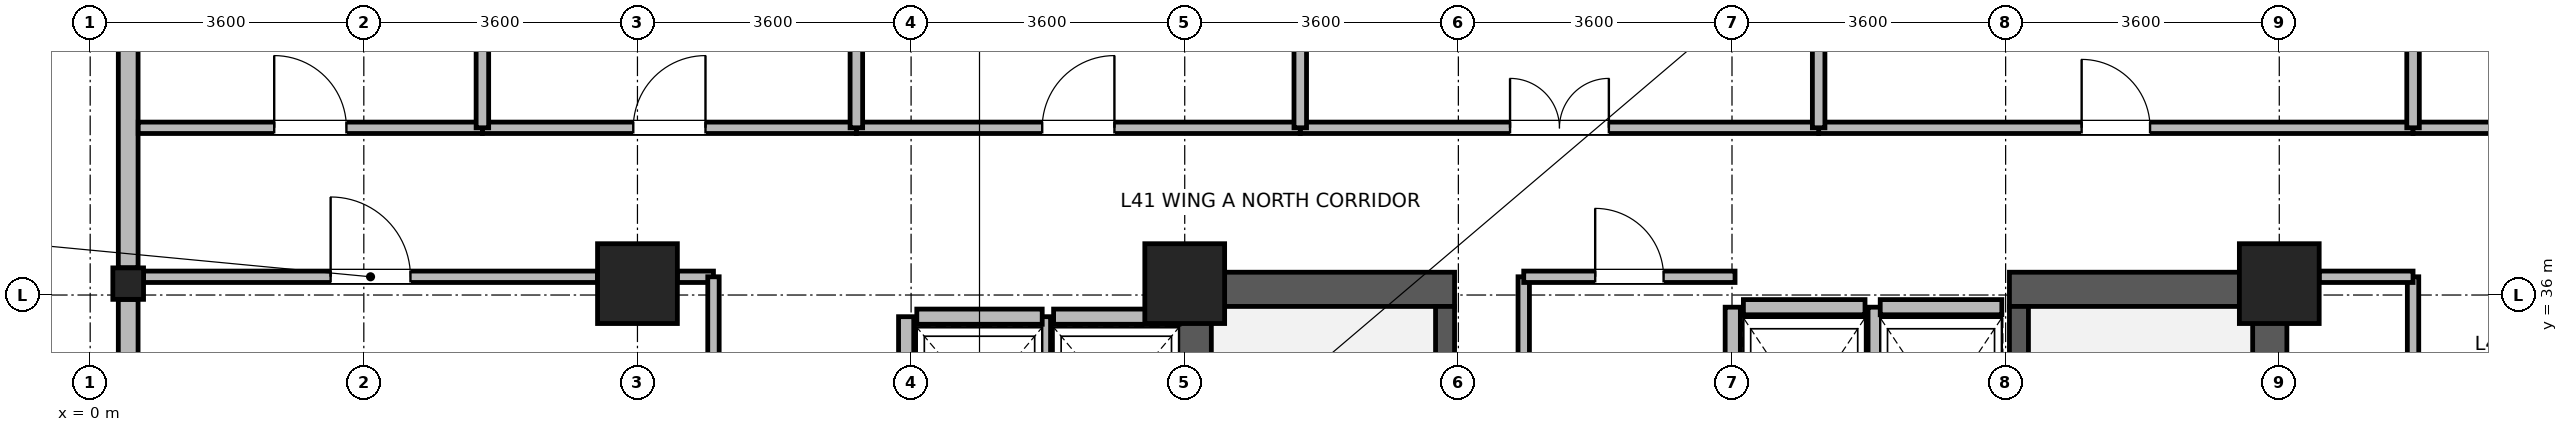
"""IFC4 building model, lengths in metres.
Left out: names, types, materials, properties, quantities, classifications, styles, units other than length and angle.
Written with IfcOpenShell. Run it as: python <this file> out.ifc"""

import sys

from ifc_helpers import new_model, si_unit, direction, frame, frame_2d, origin, origin_2d, place, context, subcontext, project, spatial, rectangle, i_section, extrude, source, transform, mapped, element, fill, save


model = new_model("IFC4")
c1 = context("Model", 3, precision=1e-05, world=origin(), true_north=direction((0.0, 1.0)))
c2 = subcontext(c1, "Body", "Model", "MODEL_VIEW")
j1 = project(units=[si_unit("LENGTHUNIT", "METRE"), si_unit("PLANEANGLEUNIT", "RADIAN")], contexts=[c1])
p1 = place(None, origin())
s1 = spatial("IfcSite", under=j1, at=p1, CompositionType="ELEMENT")
p2 = place(p1, origin())
s2 = spatial("IfcBuilding", under=s1, at=p2, CompositionType="ELEMENT")
p3 = place(p2, frame((0.0, 0.0, 162.4)))
s3 = spatial("IfcBuildingStorey", under=s2, at=p3, CompositionType="ELEMENT", Elevation=162.4)
for number, where, z_axis, x_axis in (
    (1, (14.525, 28.4, 0.0), (0.0, 0.0, 1.0), (0.0, 1.0, 0.0)),
    (2, (28.675, 28.4, 0.0), (0.0, 0.0, 1.0), (0.0, 1.0, 0.0)),
):
    element("IfcWall", number, at=place(p3, frame(where, z_axis=z_axis, x_axis=x_axis)), inside=s3, PredefinedType="SHEAR", context=c2, shape_type="SweptSolid", body=[
        extrude(rectangle(XDim=7.9, YDim=0.45, at=frame_2d((3.95, 0.0))), origin(), (0.0, 0.0, 1.0), 3.46),
    ])
for number, where, z_axis, x_axis in (
    (3, (14.75, 36.075, 0.0), (0.0, 0.0, 1.0), (1.0, 0.0, 0.0)),
    (4, (25.25, 36.075, 0.0), (0.0, 0.0, 1.0), (1.0, 0.0, 0.0)),
):
    element("IfcWall", number, at=place(p3, frame(where, z_axis=z_axis, x_axis=x_axis)), inside=s3, PredefinedType="SHEAR", context=c2, shape_type="SweptSolid", body=[
        extrude(rectangle(XDim=3.2, YDim=0.45, at=frame_2d((1.6, 0.0))), origin(), (0.0, 0.0, 1.0), 3.46),
    ])
p4 = place(p3, frame((17.825, 28.85, 0.0), z_axis=(0.0, 0.0, 1.0), x_axis=(0.0, 1.0, 0.0)))
e5 = element("IfcWall", 5, at=p4, inside=s3, PredefinedType="SHEAR", context=c2, shape_type="SweptSolid", body=[
    extrude(rectangle(XDim=7.0, YDim=0.25, at=frame_2d((3.5, 0.0))), origin(), (0.0, 0.0, 1.0), 3.46),
])
p5 = place(p4, frame((0.15, 0.0, 0.0)))
e6 = element("IfcOpeningElement", 6, at=p5, cuts=e5, PredefinedType="OPENING", context=c2, shape_type="SweptSolid", body=[
    extrude(rectangle(XDim=1.1, YDim=2.08, at=frame_2d((0.55, 1.04))), frame((0.0, 0.135, 0.0), z_axis=(0.0, -1.0, 0.0), x_axis=(1.0, 0.0, 0.0)), (0.0, 0.0, 1.0), 0.27),
])
p6 = place(p3, frame((25.375, 28.85, 0.0), z_axis=(0.0, 0.0, 1.0), x_axis=(0.0, 1.0, 0.0)))
e7 = element("IfcWall", 7, at=p6, inside=s3, PredefinedType="SHEAR", context=c2, shape_type="SweptSolid", body=[
    extrude(rectangle(XDim=7.0, YDim=0.25, at=frame_2d((3.5, 0.0))), origin(), (0.0, 0.0, 1.0), 3.46),
])
p7 = place(p6, frame((0.15, 0.0, 0.0)))
e8 = element("IfcOpeningElement", 8, at=p7, cuts=e7, PredefinedType="OPENING", context=c2, shape_type="SweptSolid", body=[
    extrude(rectangle(XDim=1.1, YDim=2.08, at=frame_2d((0.55, 1.04))), frame((0.0, 0.135, 0.0), z_axis=(0.0, -1.0, 0.0), x_axis=(1.0, 0.0, 0.0)), (0.0, 0.0, 1.0), 0.27),
])
m1 = source(origin(), c2, "Body", "SweptSolid", [
    extrude(rectangle(XDim=1.05, YDim=1.05, at=origin_2d()), origin(), (0.0, 0.0, 1.0), 3.7),
])
for number, where, z_axis, x_axis in (
    (9, (7.2, 36.15, 0.0), (0.0, 0.0, 1.0), (1.0, 0.0, 0.0)),
    (10, (14.4, 36.15, 0.0), (0.0, 0.0, 1.0), (1.0, 0.0, 0.0)),
    (11, (28.8, 36.15, 0.0), (0.0, 0.0, 1.0), (1.0, 0.0, 0.0)),
):
    element("IfcColumn", number, at=place(p3, frame(where, z_axis=z_axis, x_axis=x_axis)), inside=s3, PredefinedType="COLUMN", context=c2, shape_type="MappedRepresentation", body=[
        mapped(m1, transform((0.0, 0.0, 0.0), x_axis=(1.0, 0.0, 0.0), y_axis=(0.0, 1.0, 0.0), z_axis=(0.0, 0.0, 1.0), scale=1.0)),
    ])
m2 = source(origin(), c2, "Body", "SweptSolid", [
    extrude(i_section(OverallWidth=0.404, OverallDepth=0.414, WebThickness=0.021, FlangeThickness=0.028, FilletRadius=0.015, at=origin_2d()), origin(), (0.0, 0.0, 1.0), 3.7),
])
p8 = place(p3, frame((0.5, 36.15, 0.0), z_axis=(0.0, 0.0, 1.0), x_axis=(1.0, 0.0, 0.0)))
e12 = element("IfcColumn", 12, at=p8, inside=s3, PredefinedType="COLUMN", context=c2, shape_type="MappedRepresentation", body=[
    mapped(m2, transform((0.0, 0.0, 0.0), x_axis=(1.0, 0.0, 0.0), y_axis=(0.0, 1.0, 0.0), z_axis=(0.0, 0.0, 1.0), scale=1.0)),
])
p9 = place(p3, frame((0.5, 36.358, 0.0), z_axis=(0.0, 0.0, 1.0), x_axis=(0.0, 1.0, 0.0)))
e13 = element("IfcWall", 13, at=p9, inside=s3, PredefinedType="STANDARD", context=c2, shape_type="SweptSolid", body=[
    extrude(rectangle(XDim=6.972, YDim=0.26, at=frame_2d((3.486, 0.0))), origin(), (0.0, 0.0, 1.0), 3.44),
])
p10 = place(p9, frame((4.329, 0.0, 0.85)))
e14 = element("IfcOpeningElement", 14, at=p10, cuts=e13, PredefinedType="OPENING", context=c2, shape_type="SweptSolid", body=[
    extrude(rectangle(XDim=1.8, YDim=1.85, at=frame_2d((0.9, 0.925))), frame((0.0, 0.14, 0.0), z_axis=(0.0, -1.0, 0.0), x_axis=(1.0, 0.0, 0.0)), (0.0, 0.0, 1.0), 0.28),
])
p11 = place(p9, frame((3.011, 0.0, 0.85)))
e15 = element("IfcOpeningElement", 15, at=p11, cuts=e13, PredefinedType="OPENING", context=c2, shape_type="SweptSolid", body=[
    extrude(rectangle(XDim=0.95, YDim=1.75, at=frame_2d((0.475, 0.875))), frame((0.0, 0.14, 0.0), z_axis=(0.0, -1.0, 0.0), x_axis=(1.0, 0.0, 0.0)), (0.0, 0.0, 1.0), 0.28),
])
p12 = place(p3, frame((0.5, 28.858, 0.0), z_axis=(0.0, 0.0, 1.0), x_axis=(0.0, 1.0, 0.0)))
e16 = element("IfcWall", 16, at=p12, inside=s3, PredefinedType="STANDARD", context=c2, shape_type="SweptSolid", body=[
    extrude(rectangle(XDim=7.084, YDim=0.26, at=frame_2d((3.542, 0.0))), origin(), (0.0, 0.0, 1.0), 2.99),
])
p13 = place(p12, frame((0.871, 0.0, 0.85)))
e17 = element("IfcOpeningElement", 17, at=p13, cuts=e16, PredefinedType="OPENING", context=c2, shape_type="SweptSolid", body=[
    extrude(rectangle(XDim=1.8, YDim=1.85, at=frame_2d((0.9, 0.925))), frame((0.0, 0.14, 0.0), z_axis=(0.0, -1.0, 0.0), x_axis=(1.0, 0.0, 0.0)), (0.0, 0.0, 1.0), 0.28),
])
p14 = place(p12, frame((4.413, 0.0, 0.85)))
e18 = element("IfcOpeningElement", 18, at=p14, cuts=e16, PredefinedType="OPENING", context=c2, shape_type="SweptSolid", body=[
    extrude(rectangle(XDim=1.8, YDim=1.85, at=frame_2d((0.9, 0.925))), frame((0.0, 0.14, 0.0), z_axis=(0.0, -1.0, 0.0), x_axis=(1.0, 0.0, 0.0)), (0.0, 0.0, 1.0), 0.28),
])
p15 = place(p3, frame((12.675, 35.715, 0.0), z_axis=(0.0, 0.0, 1.0), x_axis=(1.0, 0.0, 0.0)))
e19 = element("IfcWall", 19, at=p15, inside=s3, PredefinedType="PARTITIONING", context=c2, shape_type="SweptSolid", body=[
    extrude(rectangle(XDim=1.65, YDim=0.2, at=frame_2d((0.825, 0.0))), origin(), (0.0, 0.0, 1.0), 3.44),
])
p16 = place(p3, frame((12.535, 33.485, 0.0), z_axis=(0.0, 0.0, 1.0), x_axis=(0.0, 1.0, 0.0)))
e20 = element("IfcWall", 20, at=p16, inside=s3, PredefinedType="PARTITIONING", context=c2, shape_type="SweptSolid", body=[
    extrude(rectangle(XDim=2.23, YDim=0.2, at=frame_2d((1.115, 0.0))), origin(), (0.0, 0.0, 1.0), 3.44),
])
p17 = place(p3, frame((10.875, 35.715, 0.0), z_axis=(0.0, 0.0, 1.0), x_axis=(1.0, 0.0, 0.0)))
e21 = element("IfcWall", 21, at=p17, inside=s3, PredefinedType="PARTITIONING", context=c2, shape_type="SweptSolid", body=[
    extrude(rectangle(XDim=1.65, YDim=0.2, at=frame_2d((0.825, 0.0))), origin(), (0.0, 0.0, 1.0), 3.44),
])
p18 = place(p3, frame((10.735, 33.485, 0.0), z_axis=(0.0, 0.0, 1.0), x_axis=(0.0, 1.0, 0.0)))
e22 = element("IfcWall", 22, at=p18, inside=s3, PredefinedType="PARTITIONING", context=c2, shape_type="SweptSolid", body=[
    extrude(rectangle(XDim=2.23, YDim=0.2, at=frame_2d((1.115, 0.0))), origin(), (0.0, 0.0, 1.0), 3.44),
])
p19 = place(p3, frame((21.75, 35.84, 0.0), z_axis=(0.0, 0.0, 1.0), x_axis=(1.0, 0.0, 0.0)))
e23 = element("IfcWall", 23, at=p19, inside=s3, PredefinedType="PARTITIONING", context=c2, shape_type="SweptSolid", body=[
    extrude(rectangle(XDim=1.6, YDim=0.2, at=frame_2d((0.8, 0.0))), origin(), (0.0, 0.0, 1.0), 2.44),
])
for number, where, z_axis, x_axis in (
    (24, (21.61, 33.16, 0.0), (0.0, 0.0, 1.0), (0.0, 1.0, 0.0)),
    (25, (23.49, 33.16, 0.0), (0.0, 0.0, 1.0), (0.0, 1.0, 0.0)),
):
    element("IfcWall", number, at=place(p3, frame(where, z_axis=z_axis, x_axis=x_axis)), inside=s3, PredefinedType="PARTITIONING", context=c2, shape_type="SweptSolid", body=[
        extrude(rectangle(XDim=2.68, YDim=0.2, at=frame_2d((1.34, 0.0))), origin(), (0.0, 0.0, 1.0), 3.44),
    ])
p20 = place(p3, frame((23.55, 35.84, 0.0), z_axis=(0.0, 0.0, 1.0), x_axis=(1.0, 0.0, 0.0)))
e26 = element("IfcWall", 26, at=p20, inside=s3, PredefinedType="PARTITIONING", context=c2, shape_type="SweptSolid", body=[
    extrude(rectangle(XDim=1.6, YDim=0.2, at=frame_2d((0.8, 0.0))), origin(), (0.0, 0.0, 1.0), 2.44),
])
p21 = place(p3, frame((22.74, 38.2, 0.0), z_axis=(0.0, 0.0, 1.0), x_axis=(1.0, 0.0, 0.0)))
e27 = element("IfcWall", 27, at=p21, inside=s3, PredefinedType="PARTITIONING", context=c2, shape_type="SweptSolid", body=[
    extrude(rectangle(XDim=7.82, YDim=0.15, at=frame_2d((3.91, 0.0))), origin(), (0.0, 0.0, 1.0), 3.44),
])
p22 = place(p21, frame((3.46, 0.0, 0.0)))
e28 = element("IfcOpeningElement", 28, at=p22, cuts=e27, PredefinedType="OPENING", context=c2, shape_type="SweptSolid", body=[
    extrude(rectangle(XDim=0.9, YDim=2.08, at=frame_2d((0.45, 1.04))), frame((0.0, 0.085, 0.0), z_axis=(0.0, -1.0, 0.0), x_axis=(1.0, 0.0, 0.0)), (0.0, 0.0, 1.0), 0.17),
])
p23 = place(p3, frame((0.702, 36.24, 0.0), z_axis=(0.0, 0.0, 1.0), x_axis=(1.0, 0.0, 0.0)))
e29 = element("IfcWall", 29, at=p23, inside=s3, PredefinedType="PARTITIONING", context=c2, shape_type="SweptSolid", body=[
    extrude(rectangle(XDim=5.973, YDim=0.15, at=frame_2d((2.987, 0.0))), origin(), (0.0, 0.0, 1.0), 2.84),
])
p24 = place(p23, frame((2.461, 0.0, 0.0)))
e30 = element("IfcOpeningElement", 30, at=p24, cuts=e29, PredefinedType="OPENING", context=c2, shape_type="SweptSolid", body=[
    extrude(rectangle(XDim=1.05, YDim=2.12, at=frame_2d((0.525, 1.06))), frame((0.0, 0.085, 0.0), z_axis=(0.0, -1.0, 0.0), x_axis=(1.0, 0.0, 0.0)), (0.0, 0.0, 1.0), 0.17),
])
p25 = place(p3, frame((7.725, 36.24, 0.0), z_axis=(0.0, 0.0, 1.0), x_axis=(1.0, 0.0, 0.0)))
e31 = element("IfcWall", 31, at=p25, inside=s3, PredefinedType="PARTITIONING", context=c2, shape_type="SweptSolid", body=[
    extrude(rectangle(XDim=0.475, YDim=0.15, at=frame_2d((0.237, 0.0))), origin(), (0.0, 0.0, 1.0), 2.84),
])
p26 = place(p3, frame((15.92, 38.2, 0.0), z_axis=(0.0, 0.0, 1.0), x_axis=(1.0, 0.0, 0.0)))
e32 = element("IfcWall", 32, at=p26, inside=s3, PredefinedType="PARTITIONING", context=c2, shape_type="SweptSolid", body=[
    extrude(rectangle(XDim=6.82, YDim=0.15, at=frame_2d((3.41, 0.0))), origin(), (0.0, 0.0, 1.0), 3.44),
])
p27 = place(p26, frame((2.76, 0.0, 0.0)))
e33 = element("IfcOpeningElement", 33, at=p27, cuts=e32, PredefinedType="OPENING", context=c2, shape_type="SweptSolid", body=[
    extrude(rectangle(XDim=1.3, YDim=2.12, at=frame_2d((0.65, 1.06))), frame((0.0, 0.085, 0.0), z_axis=(0.0, -1.0, 0.0), x_axis=(1.0, 0.0, 0.0)), (0.0, 0.0, 1.0), 0.17),
])
p28 = place(p3, frame((10.08, 38.2, 0.0), z_axis=(0.0, 0.0, 1.0), x_axis=(1.0, 0.0, 0.0)))
e34 = element("IfcWall", 34, at=p28, inside=s3, PredefinedType="PARTITIONING", context=c2, shape_type="SweptSolid", body=[
    extrude(rectangle(XDim=5.84, YDim=0.15, at=frame_2d((2.92, 0.0))), origin(), (0.0, 0.0, 1.0), 3.44),
])
p29 = place(p28, frame((2.445, 0.0, 0.0)))
e35 = element("IfcOpeningElement", 35, at=p29, cuts=e34, PredefinedType="OPENING", context=c2, shape_type="SweptSolid", body=[
    extrude(rectangle(XDim=0.95, YDim=2.1, at=frame_2d((0.475, 1.05))), frame((0.0, 0.085, 0.0), z_axis=(0.0, -1.0, 0.0), x_axis=(1.0, 0.0, 0.0)), (0.0, 0.0, 1.0), 0.17),
])
p30 = place(p3, frame((5.16, 38.2, 0.0), z_axis=(0.0, 0.0, 1.0), x_axis=(1.0, 0.0, 0.0)))
e36 = element("IfcWall", 36, at=p30, inside=s3, PredefinedType="PARTITIONING", context=c2, shape_type="SweptSolid", body=[
    extrude(rectangle(XDim=4.92, YDim=0.15, at=frame_2d((2.46, 0.0))), origin(), (0.0, 0.0, 1.0), 3.44),
])
p31 = place(p30, frame((1.985, 0.0, 0.0)))
e37 = element("IfcOpeningElement", 37, at=p31, cuts=e36, PredefinedType="OPENING", context=c2, shape_type="SweptSolid", body=[
    extrude(rectangle(XDim=0.95, YDim=2.1, at=frame_2d((0.475, 1.05))), frame((0.0, 0.085, 0.0), z_axis=(0.0, -1.0, 0.0), x_axis=(1.0, 0.0, 0.0)), (0.0, 0.0, 1.0), 0.17),
])
p32 = place(p3, frame((30.56, 38.2, 0.0), z_axis=(0.0, 0.0, 1.0), x_axis=(1.0, 0.0, 0.0)))
e38 = element("IfcWall", 38, at=p32, inside=s3, PredefinedType="PARTITIONING", context=c2, shape_type="SweptSolid", body=[
    extrude(rectangle(XDim=4.8, YDim=0.15, at=frame_2d((2.4, 0.0))), origin(), (0.0, 0.0, 1.0), 3.44),
])
p33 = place(p32, frame((1.75, 0.0, 0.0)))
e39 = element("IfcOpeningElement", 39, at=p33, cuts=e38, PredefinedType="OPENING", context=c2, shape_type="SweptSolid", body=[
    extrude(rectangle(XDim=1.3, YDim=2.12, at=frame_2d((0.65, 1.06))), frame((0.0, 0.085, 0.0), z_axis=(0.0, -1.0, 0.0), x_axis=(1.0, 0.0, 0.0)), (0.0, 0.0, 1.0), 0.17),
])
p34 = place(p3, frame((0.632, 38.2, 0.0), z_axis=(0.0, 0.0, 1.0), x_axis=(1.0, 0.0, 0.0)))
e40 = element("IfcWall", 40, at=p34, inside=s3, PredefinedType="PARTITIONING", context=c2, shape_type="SweptSolid", body=[
    extrude(rectangle(XDim=4.528, YDim=0.15, at=frame_2d((2.264, 0.0))), origin(), (0.0, 0.0, 1.0), 3.44),
])
p35 = place(p34, frame((1.789, 0.0, 0.0)))
e41 = element("IfcOpeningElement", 41, at=p35, cuts=e40, PredefinedType="OPENING", context=c2, shape_type="SweptSolid", body=[
    extrude(rectangle(XDim=0.95, YDim=2.1, at=frame_2d((0.475, 1.05))), frame((0.0, 0.085, 0.0), z_axis=(0.0, -1.0, 0.0), x_axis=(1.0, 0.0, 0.0)), (0.0, 0.0, 1.0), 0.17),
])
p36 = place(p3, frame((30.56, 31.64, 0.0), z_axis=(0.0, 0.0, 1.0), x_axis=(0.0, 1.0, 0.0)))
e42 = element("IfcWall", 42, at=p36, inside=s3, PredefinedType="PARTITIONING", context=c2, shape_type="SweptSolid", body=[
    extrude(rectangle(XDim=4.6, YDim=0.15, at=frame_2d((2.3, 0.0))), origin(), (0.0, 0.0, 1.0), 3.44),
])
p37 = place(p36, frame((1.65, 0.0, 0.0)))
e43 = element("IfcOpeningElement", 43, at=p37, cuts=e42, PredefinedType="OPENING", context=c2, shape_type="SweptSolid", body=[
    extrude(rectangle(XDim=1.3, YDim=2.12, at=frame_2d((0.65, 1.06))), frame((0.0, 0.085, 0.0), z_axis=(0.0, -1.0, 0.0), x_axis=(1.0, 0.0, 0.0)), (0.0, 0.0, 1.0), 0.17),
])
p38 = place(p3, frame((8.2, 32.4, 0.0), z_axis=(0.0, 0.0, 1.0), x_axis=(0.0, 1.0, 0.0)))
e44 = element("IfcWall", 44, at=p38, inside=s3, PredefinedType="PARTITIONING", context=c2, shape_type="SweptSolid", body=[
    extrude(rectangle(XDim=3.84, YDim=0.15, at=frame_2d((1.92, 0.0))), origin(), (0.0, 0.0, 1.0), 3.44),
])
p39 = place(p3, frame((18.86, 33.36, 0.0), z_axis=(0.0, 0.0, 1.0), x_axis=(0.0, 1.0, 0.0)))
e45 = element("IfcWall", 45, at=p39, inside=s3, PredefinedType="PARTITIONING", context=c2, shape_type="SweptSolid", body=[
    extrude(rectangle(XDim=2.88, YDim=0.15, at=frame_2d((1.44, 0.0))), origin(), (0.0, 0.0, 1.0), 3.44),
])
p40 = place(p3, frame((18.86, 36.24, 0.0), z_axis=(0.0, 0.0, 1.0), x_axis=(1.0, 0.0, 0.0)))
e46 = element("IfcWall", 46, at=p40, inside=s3, PredefinedType="PARTITIONING", context=c2, shape_type="SweptSolid", body=[
    extrude(rectangle(XDim=2.78, YDim=0.15, at=frame_2d((1.39, 0.0))), origin(), (0.0, 0.0, 1.0), 2.44),
])
p41 = place(p40, frame((0.94, 0.0, 0.0)))
e47 = element("IfcOpeningElement", 47, at=p41, cuts=e46, PredefinedType="OPENING", context=c2, shape_type="SweptSolid", body=[
    extrude(rectangle(XDim=0.9, YDim=2.08, at=frame_2d((0.45, 1.04))), frame((0.0, 0.085, 0.0), z_axis=(0.0, -1.0, 0.0), x_axis=(1.0, 0.0, 0.0)), (0.0, 0.0, 1.0), 0.17),
])
p42 = place(p3, frame((29.325, 36.24, 0.0), z_axis=(0.0, 0.0, 1.0), x_axis=(1.0, 0.0, 0.0)))
e48 = element("IfcWall", 48, at=p42, inside=s3, PredefinedType="PARTITIONING", context=c2, shape_type="SweptSolid", body=[
    extrude(rectangle(XDim=1.235, YDim=0.15, at=frame_2d((0.618, 0.0))), origin(), (0.0, 0.0, 1.0), 2.84),
])
for number, where, z_axis, x_axis in (
    (49, (15.92, 38.2, 0.0), (0.0, 0.0, 1.0), (0.0, 1.0, 0.0)),
    (50, (22.74, 38.2, 0.0), (0.0, 0.0, 1.0), (0.0, 1.0, 0.0)),
    (51, (30.56, 38.2, 0.0), (0.0, 0.0, 1.0), (0.0, 1.0, 0.0)),
):
    element("IfcWall", number, at=place(p3, frame(where, z_axis=z_axis, x_axis=x_axis)), inside=s3, PredefinedType="PARTITIONING", context=c2, shape_type="SweptSolid", body=[
        extrude(rectangle(XDim=4.868, YDim=0.165, at=frame_2d((2.434, 0.0))), origin(), (0.0, 0.0, 1.0), 3.44),
    ])
for number, where, z_axis, x_axis in (
    (52, (5.16, 38.2, 0.0), (0.0, 0.0, 1.0), (0.0, 1.0, 0.0)),
    (53, (10.08, 38.2, 0.0), (0.0, 0.0, 1.0), (0.0, 1.0, 0.0)),
):
    element("IfcWall", number, at=place(p3, frame(where, z_axis=z_axis, x_axis=x_axis)), inside=s3, PredefinedType="PARTITIONING", context=c2, shape_type="SweptSolid", body=[
        extrude(rectangle(XDim=3.1, YDim=0.165, at=frame_2d((1.55, 0.0))), origin(), (0.0, 0.0, 1.0), 3.44),
    ])
p43 = place(p22, origin())
e54 = element("IfcDoor", 54, at=p43, inside=s3, OperationType="SINGLE_SWING_LEFT", PredefinedType="DOOR", context=c2, shape_type="SweptSolid", body=[
    extrude(rectangle(XDim=0.9, YDim=2.08, at=frame_2d((0.45, 1.04))), frame((0.0, 0.025, 0.0), z_axis=(0.0, -1.0, 0.0), x_axis=(1.0, 0.0, 0.0)), (0.0, 0.0, 1.0), 0.05),
])
fill(e28, e54)
p44 = place(p24, origin())
e55 = element("IfcDoor", 55, at=p44, inside=s3, OperationType="SINGLE_SWING_LEFT", PredefinedType="DOOR", context=c2, shape_type="SweptSolid", body=[
    extrude(rectangle(XDim=1.05, YDim=2.12, at=frame_2d((0.525, 1.06))), frame((0.0, 0.025, 0.0), z_axis=(0.0, -1.0, 0.0), x_axis=(1.0, 0.0, 0.0)), (0.0, 0.0, 1.0), 0.05),
])
fill(e30, e55)
p45 = place(p27, origin())
e56 = element("IfcDoor", 56, at=p45, inside=s3, OperationType="DOUBLE_DOOR_SINGLE_SWING", PredefinedType="DOOR", context=c2, shape_type="SweptSolid", body=[
    extrude(rectangle(XDim=1.3, YDim=2.12, at=frame_2d((0.65, 1.06))), frame((0.0, 0.025, 0.0), z_axis=(0.0, -1.0, 0.0), x_axis=(1.0, 0.0, 0.0)), (0.0, 0.0, 1.0), 0.05),
])
fill(e33, e56)
p46 = place(p29, origin())
e57 = element("IfcDoor", 57, at=p46, inside=s3, OperationType="SINGLE_SWING_RIGHT", PredefinedType="DOOR", context=c2, shape_type="SweptSolid", body=[
    extrude(rectangle(XDim=0.95, YDim=2.1, at=frame_2d((0.475, 1.05))), frame((0.0, 0.025, 0.0), z_axis=(0.0, -1.0, 0.0), x_axis=(1.0, 0.0, 0.0)), (0.0, 0.0, 1.0), 0.05),
])
fill(e35, e57)
p47 = place(p31, origin())
e58 = element("IfcDoor", 58, at=p47, inside=s3, OperationType="SINGLE_SWING_RIGHT", PredefinedType="DOOR", context=c2, shape_type="SweptSolid", body=[
    extrude(rectangle(XDim=0.95, YDim=2.1, at=frame_2d((0.475, 1.05))), frame((0.0, 0.025, 0.0), z_axis=(0.0, -1.0, 0.0), x_axis=(1.0, 0.0, 0.0)), (0.0, 0.0, 1.0), 0.05),
])
fill(e37, e58)
p48 = place(p35, origin())
e59 = element("IfcDoor", 59, at=p48, inside=s3, OperationType="SINGLE_SWING_LEFT", PredefinedType="DOOR", context=c2, shape_type="SweptSolid", body=[
    extrude(rectangle(XDim=0.95, YDim=2.1, at=frame_2d((0.475, 1.05))), frame((0.0, 0.025, 0.0), z_axis=(0.0, -1.0, 0.0), x_axis=(1.0, 0.0, 0.0)), (0.0, 0.0, 1.0), 0.05),
])
fill(e41, e59)
p49 = place(p41, origin())
e60 = element("IfcDoor", 60, at=p49, inside=s3, OperationType="SINGLE_SWING_LEFT", PredefinedType="DOOR", context=c2, shape_type="SweptSolid", body=[
    extrude(rectangle(XDim=0.9, YDim=2.08, at=frame_2d((0.45, 1.04))), frame((0.0, 0.025, 0.0), z_axis=(0.0, -1.0, 0.0), x_axis=(1.0, 0.0, 0.0)), (0.0, 0.0, 1.0), 0.05),
])
fill(e47, e60)
save(model, sys.argv[1])
